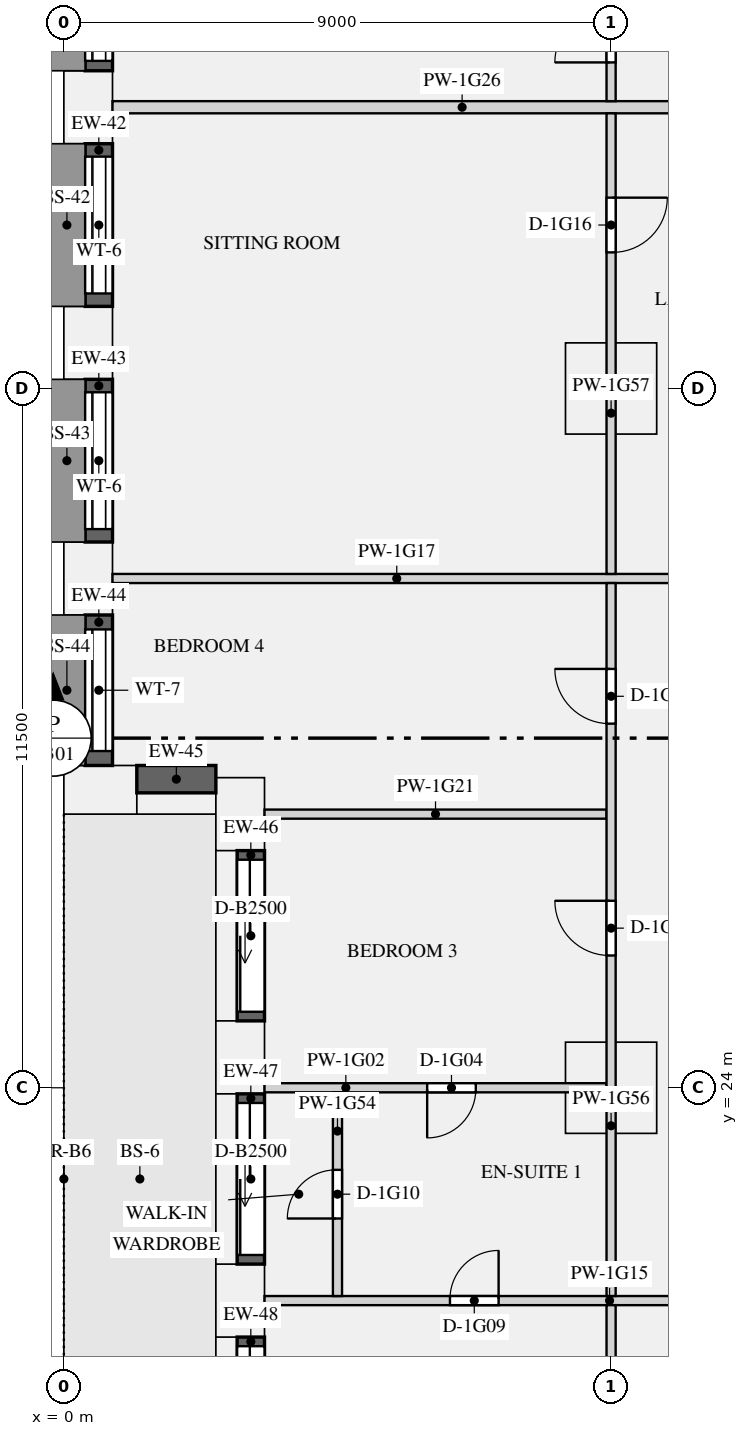
"""IFC4 building model, lengths in metres.
Left out: names, types, materials, properties, quantities, classifications, styles, units other than length and angle.
Written with IfcOpenShell. Run it as: python <this file> out.ifc"""

import sys

from ifc_helpers import new_model, si_unit, direction, frame, frame_2d, origin, origin_2d, place, context, subcontext, project, spatial, rectangle, extrude, element, fill, save


model = new_model("IFC4")
c1 = context("Model", 3, precision=1e-05, world=origin(), true_north=direction((0.0, 1.0)))
c2 = subcontext(c1, "Body", "Model", "MODEL_VIEW")
j1 = project(units=[si_unit("LENGTHUNIT", "METRE"), si_unit("PLANEANGLEUNIT", "RADIAN")], contexts=[c1])
p1 = place(None, origin())
s1 = spatial("IfcSite", under=j1, at=p1, CompositionType="ELEMENT")
p2 = place(p1, origin())
s2 = spatial("IfcBuilding", under=s1, at=p2, CompositionType="ELEMENT")
p3 = place(p2, frame((0.0, 0.0, 66.75)))
s3 = spatial("IfcBuildingStorey", under=s2, at=p3, CompositionType="ELEMENT", Elevation=66.75)
for number, where, z_axis, x_axis in (
    (1, (0.4, 40.125, 0.0), (0.0, 0.0, 1.0), (0.0, -1.0, 0.0)),
    (2, (0.4, 36.25, 0.0), (0.0, 0.0, 1.0), (0.0, -1.0, 0.0)),
    (3, (0.4, 32.375, 0.0), (0.0, 0.0, 1.0), (0.0, -1.0, 0.0)),
    (4, (0.6, 28.9, 0.0), (0.0, 0.0, 1.0), (1.0, 0.0, 0.0)),
    (5, (2.9, 28.5, 0.0), (0.0, 0.0, 1.0), (0.0, -1.0, 0.0)),
    (6, (2.9, 24.5, 0.0), (0.0, 0.0, 1.0), (0.0, -1.0, 0.0)),
    (7, (2.9, 20.5, 0.0), (0.0, 0.0, 1.0), (0.0, -1.0, 0.0)),
):
    element("IfcColumn", number, at=place(p3, frame(where, z_axis=z_axis, x_axis=x_axis)), inside=s3, PredefinedType="USERDEFINED", context=c2, shape_type="SweptSolid", body=[
        extrude(rectangle(XDim=1.2, YDim=0.8, at=origin_2d()), origin(), (0.0, 0.0, 1.0), 3.15),
    ])
for number, where, z_axis, x_axis in (
    (8, (9.0, 24.0, 0.0), (0.0, 0.0, 1.0), (1.0, 0.0, 0.0)),
    (9, (9.0, 35.5, 0.0), (0.0, 0.0, 1.0), (1.0, 0.0, 0.0)),
):
    element("IfcColumn", number, at=place(p3, frame(where, z_axis=z_axis, x_axis=x_axis)), inside=s3, PredefinedType="COLUMN", context=c2, shape_type="SweptSolid", body=[
        extrude(rectangle(XDim=1.5, YDim=1.5, at=origin_2d()), origin(), (0.0, 0.0, 1.0), 3.15),
    ])
p4 = place(p3, frame((0.575, 42.8, 0.9), z_axis=(0.0, 0.0, 1.0), x_axis=(0.0, -1.0, 0.0)))
e10 = element("IfcWall", 10, at=p4, inside=s3, PredefinedType="SOLIDWALL", context=c2, shape_type="SweptSolid", body=[
    extrude(rectangle(XDim=2.075, YDim=0.45, at=frame_2d((1.038, 0.0))), origin(), (0.0, 0.0, 1.0), 1.93),
])
p5 = place(p4, frame((0.163, 0.0, 0.15)))
e11 = element("IfcOpeningElement", 11, at=p5, cuts=e10, PredefinedType="OPENING", context=c2, shape_type="SweptSolid", body=[
    extrude(rectangle(XDim=1.75, YDim=1.5, at=frame_2d((0.875, 0.75))), frame((0.0, 0.235, 0.0), z_axis=(0.0, -1.0, 0.0), x_axis=(1.0, 0.0, 0.0)), (0.0, 0.0, 1.0), 0.47),
])
p6 = place(p3, frame((0.575, 39.525, 0.9), z_axis=(0.0, 0.0, 1.0), x_axis=(0.0, -1.0, 0.0)))
e12 = element("IfcWall", 12, at=p6, inside=s3, PredefinedType="SOLIDWALL", context=c2, shape_type="SweptSolid", body=[
    extrude(rectangle(XDim=2.675, YDim=0.45, at=frame_2d((1.337, 0.0))), origin(), (0.0, 0.0, 1.0), 1.93),
])
p7 = place(p6, frame((0.212, 0.0, 0.15)))
e13 = element("IfcOpeningElement", 13, at=p7, cuts=e12, PredefinedType="OPENING", context=c2, shape_type="SweptSolid", body=[
    extrude(rectangle(XDim=2.25, YDim=1.5, at=frame_2d((1.125, 0.75))), frame((0.0, 0.235, 0.0), z_axis=(0.0, -1.0, 0.0), x_axis=(1.0, 0.0, 0.0)), (0.0, 0.0, 1.0), 0.47),
])
p8 = place(p3, frame((0.575, 35.65, 0.9), z_axis=(0.0, 0.0, 1.0), x_axis=(0.0, -1.0, 0.0)))
e14 = element("IfcWall", 14, at=p8, inside=s3, PredefinedType="SOLIDWALL", context=c2, shape_type="SweptSolid", body=[
    extrude(rectangle(XDim=2.675, YDim=0.45, at=frame_2d((1.337, 0.0))), origin(), (0.0, 0.0, 1.0), 1.93),
])
p9 = place(p8, frame((0.212, 0.0, 0.15)))
e15 = element("IfcOpeningElement", 15, at=p9, cuts=e14, PredefinedType="OPENING", context=c2, shape_type="SweptSolid", body=[
    extrude(rectangle(XDim=2.25, YDim=1.5, at=frame_2d((1.125, 0.75))), frame((0.0, 0.235, 0.0), z_axis=(0.0, -1.0, 0.0), x_axis=(1.0, 0.0, 0.0)), (0.0, 0.0, 1.0), 0.47),
])
p10 = place(p3, frame((0.575, 31.775, 0.9), z_axis=(0.0, 0.0, 1.0), x_axis=(0.0, -1.0, 0.0)))
e16 = element("IfcWall", 16, at=p10, inside=s3, PredefinedType="SOLIDWALL", context=c2, shape_type="SweptSolid", body=[
    extrude(rectangle(XDim=2.475, YDim=0.45, at=frame_2d((1.237, 0.0))), origin(), (0.0, 0.0, 1.0), 1.93),
])
p11 = place(p10, frame((0.238, 0.0, 0.15)))
e17 = element("IfcOpeningElement", 17, at=p11, cuts=e16, PredefinedType="OPENING", context=c2, shape_type="SweptSolid", body=[
    extrude(rectangle(XDim=2.0, YDim=1.5, at=frame_2d((1.0, 0.75))), frame((0.0, 0.235, 0.0), z_axis=(0.0, -1.0, 0.0), x_axis=(1.0, 0.0, 0.0)), (0.0, 0.0, 1.0), 0.47),
])
p12 = place(p3, frame((1.2, 29.075, 0.9), z_axis=(0.0, 0.0, 1.0), x_axis=(1.0, 0.0, 0.0)))
e18 = element("IfcWall", 18, at=p12, inside=s3, PredefinedType="SOLIDWALL", context=c2, shape_type="SweptSolid", body=[
    extrude(rectangle(XDim=1.3, YDim=0.45, at=frame_2d((0.65, 0.0))), origin(), (0.0, 0.0, 1.0), 1.93),
])
p13 = place(p3, frame((3.075, 27.9, 0.0), z_axis=(0.0, 0.0, 1.0), x_axis=(0.0, -1.0, 0.0)))
e19 = element("IfcWall", 19, at=p13, inside=s3, PredefinedType="SOLIDWALL", context=c2, shape_type="SweptSolid", body=[
    extrude(rectangle(XDim=2.8, YDim=0.45, at=frame_2d((1.4, 0.0))), origin(), (0.0, 0.0, 1.0), 2.83),
])
p14 = place(p13, frame((0.15, 0.0, 0.0)))
e20 = element("IfcOpeningElement", 20, at=p14, cuts=e19, PredefinedType="OPENING", context=c2, shape_type="SweptSolid", body=[
    extrude(rectangle(XDim=2.5, YDim=2.3, at=frame_2d((1.25, 1.15))), frame((0.0, 0.235, 0.0), z_axis=(0.0, -1.0, 0.0), x_axis=(1.0, 0.0, 0.0)), (0.0, 0.0, 1.0), 0.47),
])
p15 = place(p3, frame((3.075, 23.9, 0.0), z_axis=(0.0, 0.0, 1.0), x_axis=(0.0, -1.0, 0.0)))
e21 = element("IfcWall", 21, at=p15, inside=s3, PredefinedType="SOLIDWALL", context=c2, shape_type="SweptSolid", body=[
    extrude(rectangle(XDim=2.8, YDim=0.45, at=frame_2d((1.4, 0.0))), origin(), (0.0, 0.0, 1.0), 2.83),
])
p16 = place(p15, frame((0.15, 0.0, 0.0)))
e22 = element("IfcOpeningElement", 22, at=p16, cuts=e21, PredefinedType="OPENING", context=c2, shape_type="SweptSolid", body=[
    extrude(rectangle(XDim=2.5, YDim=2.3, at=frame_2d((1.25, 1.15))), frame((0.0, 0.235, 0.0), z_axis=(0.0, -1.0, 0.0), x_axis=(1.0, 0.0, 0.0)), (0.0, 0.0, 1.0), 0.47),
])
p17 = place(p3, frame((3.075, 19.9, 0.0), z_axis=(0.0, 0.0, 1.0), x_axis=(0.0, -1.0, 0.0)))
e23 = element("IfcWall", 23, at=p17, inside=s3, PredefinedType="SOLIDWALL", context=c2, shape_type="SweptSolid", body=[
    extrude(rectangle(XDim=3.4, YDim=0.45, at=frame_2d((1.7, 0.0))), origin(), (0.0, 0.0, 1.0), 2.83),
])
p18 = place(p17, frame((0.15, 0.0, 0.0)))
e24 = element("IfcOpeningElement", 24, at=p18, cuts=e23, PredefinedType="OPENING", context=c2, shape_type="SweptSolid", body=[
    extrude(rectangle(XDim=3.1, YDim=2.3, at=frame_2d((1.55, 1.15))), frame((0.0, 0.235, 0.0), z_axis=(0.0, -1.0, 0.0), x_axis=(1.0, 0.0, 0.0)), (0.0, 0.0, 1.0), 0.47),
])
p19 = place(p3, frame((3.3, 24.0, 0.0), z_axis=(0.0, 0.0, 1.0), x_axis=(1.0, 0.0, 0.0)))
e25 = element("IfcWall", 25, at=p19, inside=s3, PredefinedType="PARTITIONING", context=c2, shape_type="SweptSolid", body=[
    extrude(rectangle(XDim=5.625, YDim=0.15, at=frame_2d((2.812, 0.0))), origin(), (0.0, 0.0, 1.0), 2.83),
])
p20 = place(p19, frame((2.675, 0.0, 0.0)))
e26 = element("IfcOpeningElement", 26, at=p20, cuts=e25, PredefinedType="OPENING", context=c2, shape_type="SweptSolid", body=[
    extrude(rectangle(XDim=0.8, YDim=2.1, at=frame_2d((0.4, 1.05))), frame((0.0, 0.085, 0.0), z_axis=(0.0, -1.0, 0.0), x_axis=(1.0, 0.0, 0.0)), (0.0, 0.0, 1.0), 0.17),
])
p21 = place(p3, frame((3.3, 20.5, 0.0), z_axis=(0.0, 0.0, 1.0), x_axis=(1.0, 0.0, 0.0)))
e27 = element("IfcWall", 27, at=p21, inside=s3, PredefinedType="PARTITIONING", context=c2, shape_type="SweptSolid", body=[
    extrude(rectangle(XDim=10.275, YDim=0.15, at=frame_2d((5.137, 0.0))), origin(), (0.0, 0.0, 1.0), 2.83),
])
p22 = place(p21, frame((7.5, 0.0, 0.0)))
e28 = element("IfcOpeningElement", 28, at=p22, cuts=e27, PredefinedType="OPENING", context=c2, shape_type="SweptSolid", body=[
    extrude(rectangle(XDim=0.9, YDim=2.1, at=frame_2d((0.45, 1.05))), frame((0.0, 0.085, 0.0), z_axis=(0.0, -1.0, 0.0), x_axis=(1.0, 0.0, 0.0)), (0.0, 0.0, 1.0), 0.17),
])
p23 = place(p21, frame((3.05, 0.0, 0.0)))
e29 = element("IfcOpeningElement", 29, at=p23, cuts=e27, PredefinedType="OPENING", context=c2, shape_type="SweptSolid", body=[
    extrude(rectangle(XDim=0.8, YDim=2.1, at=frame_2d((0.4, 1.05))), frame((0.0, 0.085, 0.0), z_axis=(0.0, -1.0, 0.0), x_axis=(1.0, 0.0, 0.0)), (0.0, 0.0, 1.0), 0.17),
])
p24 = place(p3, frame((0.8, 32.375, 0.0), z_axis=(0.0, 0.0, 1.0), x_axis=(1.0, 0.0, 0.0)))
e30 = element("IfcWall", 30, at=p24, inside=s3, PredefinedType="PARTITIONING", context=c2, shape_type="SweptSolid", body=[
    extrude(rectangle(XDim=11.4, YDim=0.15, at=frame_2d((5.7, 0.0))), origin(), (0.0, 0.0, 1.0), 2.83),
])
p25 = place(p24, frame((9.35, 0.0, 0.0)))
e31 = element("IfcOpeningElement", 31, at=p25, cuts=e30, PredefinedType="OPENING", context=c2, shape_type="SweptSolid", body=[
    extrude(rectangle(XDim=0.9, YDim=2.1, at=frame_2d((0.45, 1.05))), frame((0.0, 0.085, 0.0), z_axis=(0.0, -1.0, 0.0), x_axis=(1.0, 0.0, 0.0)), (0.0, 0.0, 1.0), 0.17),
])
p26 = place(p3, frame((3.3, 28.5, 0.0), z_axis=(0.0, 0.0, 1.0), x_axis=(1.0, 0.0, 0.0)))
e32 = element("IfcWall", 32, at=p26, inside=s3, PredefinedType="PARTITIONING", context=c2, shape_type="SweptSolid", body=[
    extrude(rectangle(XDim=5.625, YDim=0.15, at=frame_2d((2.812, 0.0))), origin(), (0.0, 0.0, 1.0), 2.83),
])
p27 = place(p3, frame((0.8, 40.125, 0.0), z_axis=(0.0, 0.0, 1.0), x_axis=(1.0, 0.0, 0.0)))
e33 = element("IfcWall", 33, at=p27, inside=s3, PredefinedType="PARTITIONING", context=c2, shape_type="SweptSolid", body=[
    extrude(rectangle(XDim=11.5, YDim=0.2, at=frame_2d((5.75, 0.0))), origin(), (0.0, 0.0, 1.0), 2.83),
])
p28 = place(p3, frame((4.5, 20.575, 0.0), z_axis=(0.0, 0.0, 1.0), x_axis=(0.0, 1.0, 0.0)))
e34 = element("IfcWall", 34, at=p28, inside=s3, PredefinedType="PARTITIONING", context=c2, shape_type="SweptSolid", body=[
    extrude(rectangle(XDim=3.35, YDim=0.15, at=frame_2d((1.675, 0.0))), origin(), (0.0, 0.0, 1.0), 2.83),
])
p29 = place(p28, frame((1.275, 0.0, 0.0)))
e35 = element("IfcOpeningElement", 35, at=p29, cuts=e34, PredefinedType="OPENING", context=c2, shape_type="SweptSolid", body=[
    extrude(rectangle(XDim=0.8, YDim=2.1, at=frame_2d((0.4, 1.05))), frame((0.0, 0.085, 0.0), z_axis=(0.0, -1.0, 0.0), x_axis=(1.0, 0.0, 0.0)), (0.0, 0.0, 1.0), 0.17),
])
p30 = place(p3, frame((9.0, 12.575, 0.0), z_axis=(0.0, 0.0, 1.0), x_axis=(0.0, 1.0, 0.0)))
e36 = element("IfcWall", 36, at=p30, inside=s3, PredefinedType="PARTITIONING", context=c2, shape_type="SweptSolid", body=[
    extrude(rectangle(XDim=7.85, YDim=0.15, at=frame_2d((3.925, 0.0))), origin(), (0.0, 0.0, 1.0), 2.83),
])
p31 = place(p30, frame((1.9, 0.0, 0.0)))
e37 = element("IfcOpeningElement", 37, at=p31, cuts=e36, PredefinedType="OPENING", context=c2, shape_type="SweptSolid", body=[
    extrude(rectangle(XDim=0.8, YDim=2.1, at=frame_2d((0.4, 1.05))), frame((0.0, 0.085, 0.0), z_axis=(0.0, -1.0, 0.0), x_axis=(1.0, 0.0, 0.0)), (0.0, 0.0, 1.0), 0.17),
])
p32 = place(p3, frame((9.0, 20.575, 0.0), z_axis=(0.0, 0.0, 1.0), x_axis=(0.0, 1.0, 0.0)))
e38 = element("IfcWall", 38, at=p32, inside=s3, PredefinedType="PARTITIONING", context=c2, shape_type="SweptSolid", body=[
    extrude(rectangle(XDim=11.725, YDim=0.15, at=frame_2d((5.863, 0.0))), origin(), (0.0, 0.0, 1.0), 2.83),
])
p33 = place(p32, frame((5.6, 0.0, 0.0)))
e39 = element("IfcOpeningElement", 39, at=p33, cuts=e38, PredefinedType="OPENING", context=c2, shape_type="SweptSolid", body=[
    extrude(rectangle(XDim=0.9, YDim=2.1, at=frame_2d((0.45, 1.05))), frame((0.0, 0.085, 0.0), z_axis=(0.0, -1.0, 0.0), x_axis=(1.0, 0.0, 0.0)), (0.0, 0.0, 1.0), 0.17),
])
p34 = place(p32, frame((9.413, 0.0, 0.0)))
e40 = element("IfcOpeningElement", 40, at=p34, cuts=e38, PredefinedType="OPENING", context=c2, shape_type="SweptSolid", body=[
    extrude(rectangle(XDim=0.9, YDim=2.1, at=frame_2d((0.45, 1.05))), frame((0.0, 0.085, 0.0), z_axis=(0.0, -1.0, 0.0), x_axis=(1.0, 0.0, 0.0)), (0.0, 0.0, 1.0), 0.17),
])
p35 = place(p3, frame((9.0, 32.45, 0.0), z_axis=(0.0, 0.0, 1.0), x_axis=(0.0, 1.0, 0.0)))
e41 = element("IfcWall", 41, at=p35, inside=s3, PredefinedType="PARTITIONING", context=c2, shape_type="SweptSolid", body=[
    extrude(rectangle(XDim=7.575, YDim=0.15, at=frame_2d((3.788, 0.0))), origin(), (0.0, 0.0, 1.0), 2.83),
])
p36 = place(p35, frame((5.288, 0.0, 0.0)))
e42 = element("IfcOpeningElement", 42, at=p36, cuts=e41, PredefinedType="OPENING", context=c2, shape_type="SweptSolid", body=[
    extrude(rectangle(XDim=0.9, YDim=2.1, at=frame_2d((0.45, 1.05))), frame((0.0, 0.085, 0.0), z_axis=(0.0, -1.0, 0.0), x_axis=(1.0, 0.0, 0.0)), (0.0, 0.0, 1.0), 0.17),
])
p37 = place(p3, frame((9.0, 40.225, 0.0), z_axis=(0.0, 0.0, 1.0), x_axis=(0.0, 1.0, 0.0)))
e43 = element("IfcWall", 43, at=p37, inside=s3, PredefinedType="PARTITIONING", context=c2, shape_type="SweptSolid", body=[
    extrude(rectangle(XDim=7.475, YDim=0.15, at=frame_2d((3.737, 0.0))), origin(), (0.0, 0.0, 1.0), 2.83),
])
p38 = place(p37, frame((6.05, 0.0, 0.0)))
e44 = element("IfcOpeningElement", 44, at=p38, cuts=e43, PredefinedType="OPENING", context=c2, shape_type="SweptSolid", body=[
    extrude(rectangle(XDim=0.8, YDim=2.1, at=frame_2d((0.4, 1.05))), frame((0.0, 0.085, 0.0), z_axis=(0.0, -1.0, 0.0), x_axis=(1.0, 0.0, 0.0)), (0.0, 0.0, 1.0), 0.17),
])
p39 = place(p37, frame((3.375, 0.0, 0.0)))
e45 = element("IfcOpeningElement", 45, at=p39, cuts=e43, PredefinedType="OPENING", context=c2, shape_type="SweptSolid", body=[
    extrude(rectangle(XDim=0.8, YDim=2.1, at=frame_2d((0.4, 1.05))), frame((0.0, 0.085, 0.0), z_axis=(0.0, -1.0, 0.0), x_axis=(1.0, 0.0, 0.0)), (0.0, 0.0, 1.0), 0.17),
])
p40 = place(p37, frame((0.637, 0.0, 0.0)))
e46 = element("IfcOpeningElement", 46, at=p40, cuts=e43, PredefinedType="OPENING", context=c2, shape_type="SweptSolid", body=[
    extrude(rectangle(XDim=0.9, YDim=2.1, at=frame_2d((0.45, 1.05))), frame((0.0, 0.085, 0.0), z_axis=(0.0, -1.0, 0.0), x_axis=(1.0, 0.0, 0.0)), (0.0, 0.0, 1.0), 0.17),
])
p41 = place(p5, origin())
e47 = element("IfcWindow", 47, at=p41, inside=s3, PartitioningType="SINGLE_PANEL", PredefinedType="WINDOW", context=c2, shape_type="SweptSolid", body=[
    extrude(rectangle(XDim=1.75, YDim=1.5, at=frame_2d((0.875, 0.75))), frame((0.0, -0.065, 0.0), z_axis=(0.0, -1.0, 0.0), x_axis=(1.0, 0.0, 0.0)), (0.0, 0.0, 1.0), 0.06),
])
fill(e11, e47)
p42 = place(p7, origin())
e48 = element("IfcWindow", 48, at=p42, inside=s3, PartitioningType="SINGLE_PANEL", PredefinedType="WINDOW", context=c2, shape_type="SweptSolid", body=[
    extrude(rectangle(XDim=2.25, YDim=1.5, at=frame_2d((1.125, 0.75))), frame((0.0, -0.065, 0.0), z_axis=(0.0, -1.0, 0.0), x_axis=(1.0, 0.0, 0.0)), (0.0, 0.0, 1.0), 0.06),
])
fill(e13, e48)
p43 = place(p9, origin())
e49 = element("IfcWindow", 49, at=p43, inside=s3, PartitioningType="SINGLE_PANEL", PredefinedType="WINDOW", context=c2, shape_type="SweptSolid", body=[
    extrude(rectangle(XDim=2.25, YDim=1.5, at=frame_2d((1.125, 0.75))), frame((0.0, -0.065, 0.0), z_axis=(0.0, -1.0, 0.0), x_axis=(1.0, 0.0, 0.0)), (0.0, 0.0, 1.0), 0.06),
])
fill(e15, e49)
p44 = place(p11, origin())
e50 = element("IfcWindow", 50, at=p44, inside=s3, PartitioningType="SINGLE_PANEL", PredefinedType="WINDOW", context=c2, shape_type="SweptSolid", body=[
    extrude(rectangle(XDim=2.0, YDim=1.5, at=frame_2d((1.0, 0.75))), frame((0.0, -0.065, 0.0), z_axis=(0.0, -1.0, 0.0), x_axis=(1.0, 0.0, 0.0)), (0.0, 0.0, 1.0), 0.06),
])
fill(e17, e50)
p45 = place(p14, origin())
e51 = element("IfcDoor", 51, at=p45, inside=s3, OperationType="SLIDING_TO_LEFT", PredefinedType="DOOR", context=c2, shape_type="SweptSolid", body=[
    extrude(rectangle(XDim=2.5, YDim=2.3, at=frame_2d((1.25, 1.15))), frame((0.0, -0.07, 0.0), z_axis=(0.0, -1.0, 0.0), x_axis=(1.0, 0.0, 0.0)), (0.0, 0.0, 1.0), 0.05),
])
fill(e20, e51)
p46 = place(p16, origin())
e52 = element("IfcDoor", 52, at=p46, inside=s3, OperationType="SLIDING_TO_LEFT", PredefinedType="DOOR", context=c2, shape_type="SweptSolid", body=[
    extrude(rectangle(XDim=2.5, YDim=2.3, at=frame_2d((1.25, 1.15))), frame((0.0, -0.07, 0.0), z_axis=(0.0, -1.0, 0.0), x_axis=(1.0, 0.0, 0.0)), (0.0, 0.0, 1.0), 0.05),
])
fill(e22, e52)
p47 = place(p18, origin())
e53 = element("IfcDoor", 53, at=p47, inside=s3, OperationType="SLIDING_TO_LEFT", PredefinedType="DOOR", context=c2, shape_type="SweptSolid", body=[
    extrude(rectangle(XDim=3.1, YDim=2.3, at=frame_2d((1.55, 1.15))), frame((0.0, -0.07, 0.0), z_axis=(0.0, -1.0, 0.0), x_axis=(1.0, 0.0, 0.0)), (0.0, 0.0, 1.0), 0.05),
])
fill(e24, e53)
p48 = place(p20, frame((0.8, 0.0, 0.0), z_axis=(0.0, 0.0, 1.0), x_axis=(-1.0, 0.0, 0.0)))
e54 = element("IfcDoor", 54, at=p48, inside=s3, OperationType="SINGLE_SWING_RIGHT", PredefinedType="DOOR", context=c2, shape_type="SweptSolid", body=[
    extrude(rectangle(XDim=0.8, YDim=2.1, at=frame_2d((0.4, 1.05))), frame((0.0, 0.025, 0.0), z_axis=(0.0, -1.0, 0.0), x_axis=(1.0, 0.0, 0.0)), (0.0, 0.0, 1.0), 0.05),
])
fill(e26, e54)
p49 = place(p33, origin())
e55 = element("IfcDoor", 55, at=p49, inside=s3, OperationType="SINGLE_SWING_RIGHT", PredefinedType="DOOR", context=c2, shape_type="SweptSolid", body=[
    extrude(rectangle(XDim=0.9, YDim=2.1, at=frame_2d((0.45, 1.05))), frame((0.0, 0.025, 0.0), z_axis=(0.0, -1.0, 0.0), x_axis=(1.0, 0.0, 0.0)), (0.0, 0.0, 1.0), 0.05),
])
fill(e39, e55)
p50 = place(p34, origin())
e56 = element("IfcDoor", 56, at=p50, inside=s3, OperationType="SINGLE_SWING_RIGHT", PredefinedType="DOOR", context=c2, shape_type="SweptSolid", body=[
    extrude(rectangle(XDim=0.9, YDim=2.1, at=frame_2d((0.45, 1.05))), frame((0.0, 0.025, 0.0), z_axis=(0.0, -1.0, 0.0), x_axis=(1.0, 0.0, 0.0)), (0.0, 0.0, 1.0), 0.05),
])
fill(e40, e56)
p51 = place(p23, origin())
e57 = element("IfcDoor", 57, at=p51, inside=s3, OperationType="SINGLE_SWING_RIGHT", PredefinedType="DOOR", context=c2, shape_type="SweptSolid", body=[
    extrude(rectangle(XDim=0.8, YDim=2.1, at=frame_2d((0.4, 1.05))), frame((0.0, 0.025, 0.0), z_axis=(0.0, -1.0, 0.0), x_axis=(1.0, 0.0, 0.0)), (0.0, 0.0, 1.0), 0.05),
])
fill(e29, e57)
p52 = place(p29, origin())
e58 = element("IfcDoor", 58, at=p52, inside=s3, OperationType="SINGLE_SWING_LEFT", PredefinedType="DOOR", context=c2, shape_type="SweptSolid", body=[
    extrude(rectangle(XDim=0.8, YDim=2.1, at=frame_2d((0.4, 1.05))), frame((0.0, 0.025, 0.0), z_axis=(0.0, -1.0, 0.0), x_axis=(1.0, 0.0, 0.0)), (0.0, 0.0, 1.0), 0.05),
])
fill(e35, e58)
p53 = place(p36, frame((0.9, 0.0, 0.0), z_axis=(0.0, 0.0, 1.0), x_axis=(-1.0, 0.0, 0.0)))
e59 = element("IfcDoor", 59, at=p53, inside=s3, OperationType="SINGLE_SWING_LEFT", PredefinedType="DOOR", context=c2, shape_type="SweptSolid", body=[
    extrude(rectangle(XDim=0.9, YDim=2.1, at=frame_2d((0.45, 1.05))), frame((0.0, 0.025, 0.0), z_axis=(0.0, -1.0, 0.0), x_axis=(1.0, 0.0, 0.0)), (0.0, 0.0, 1.0), 0.05),
])
fill(e42, e59)
p54 = place(p40, origin())
e60 = element("IfcDoor", 60, at=p54, inside=s3, OperationType="SINGLE_SWING_LEFT", PredefinedType="DOOR", context=c2, shape_type="SweptSolid", body=[
    extrude(rectangle(XDim=0.9, YDim=2.1, at=frame_2d((0.45, 1.05))), frame((0.0, 0.025, 0.0), z_axis=(0.0, -1.0, 0.0), x_axis=(1.0, 0.0, 0.0)), (0.0, 0.0, 1.0), 0.05),
])
fill(e46, e60)
save(model, sys.argv[1])
